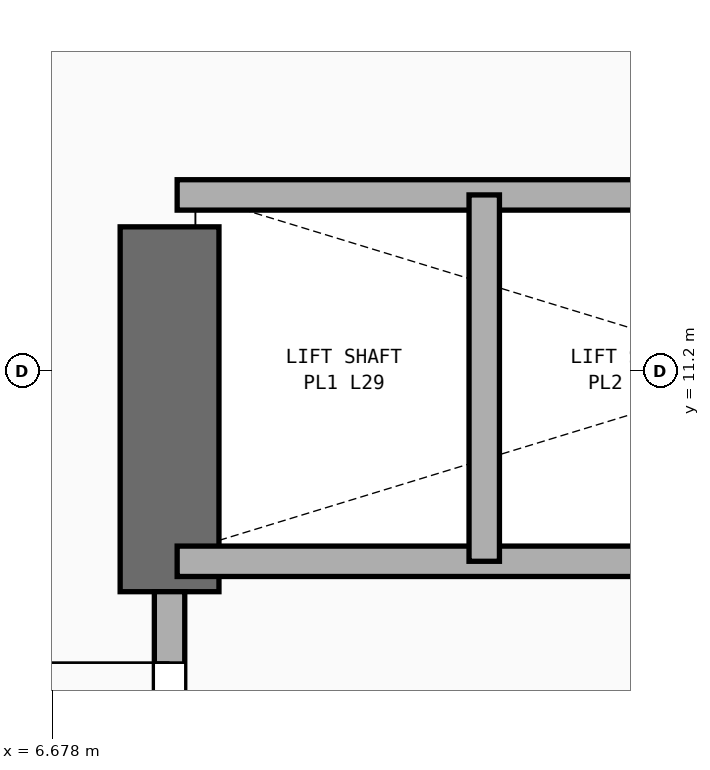
"""IFC4 building model, lengths in metres.
Left out: names, types, materials, properties, quantities, classifications, styles, units other than length and angle.
Written with IfcOpenShell. Run it as: python <this file> out.ifc"""

import sys

from ifc_helpers import new_model, si_unit, direction, frame, frame_2d, origin, place, context, subcontext, project, spatial, rectangle, extrude, element, fill, save


model = new_model("IFC4")
c1 = context("Model", 3, precision=1e-05, world=origin(), true_north=direction((0.0, 1.0)))
c2 = subcontext(c1, "Body", "Model", "MODEL_VIEW")
j1 = project(units=[si_unit("LENGTHUNIT", "METRE"), si_unit("PLANEANGLEUNIT", "RADIAN")], contexts=[c1])
p1 = place(None, origin())
s1 = spatial("IfcSite", under=j1, at=p1, CompositionType="ELEMENT")
p2 = place(p1, origin())
s2 = spatial("IfcBuilding", under=s1, at=p2, CompositionType="ELEMENT")
p3 = place(p2, frame((0.0, 0.0, 114.5)))
s3 = spatial("IfcBuildingStorey", under=s2, at=p3, CompositionType="ELEMENT", Elevation=114.5)
p4 = place(p3, frame((7.45, 9.75, 0.0), z_axis=(0.0, 0.0, 1.0), x_axis=(0.0, 1.0, 0.0)))
e1 = element("IfcWall", 1, at=p4, inside=s3, PredefinedType="SHEAR", context=c2, shape_type="SweptSolid", body=[
    extrude(rectangle(XDim=2.4, YDim=0.65, at=frame_2d((1.2, 0.0))), origin(), (0.0, 0.0, 1.0), 3.54),
])
p5 = place(p3, frame((7.5, 9.95, 0.0), z_axis=(0.0, 0.0, 1.0), x_axis=(1.0, 0.0, 0.0)))
e2 = element("IfcWall", 2, at=p5, inside=s3, PredefinedType="PARTITIONING", context=c2, shape_type="SweptSolid", body=[
    extrude(rectangle(XDim=8.35, YDim=0.2, at=frame_2d((4.175, 0.0))), origin(), (0.0, 0.0, 1.0), 3.54),
])
p6 = place(p3, frame((7.45, 7.45, 0.0), z_axis=(0.0, 0.0, 1.0), x_axis=(0.0, 1.0, 0.0)))
e3 = element("IfcWall", 3, at=p6, inside=s3, PredefinedType="PARTITIONING", context=c2, shape_type="SweptSolid", body=[
    extrude(rectangle(XDim=2.3, YDim=0.2, at=frame_2d((1.15, 0.0))), origin(), (0.0, 0.0, 1.0), 2.52),
])
p7 = place(p6, frame((0.633, 0.0, 0.0)))
e4 = element("IfcOpeningElement", 4, at=p7, cuts=e3, PredefinedType="OPENING", context=c2, shape_type="SweptSolid", body=[
    extrude(rectangle(XDim=1.2, YDim=2.25, at=frame_2d((0.6, 1.125))), frame((0.0, 0.11, 0.0), z_axis=(0.0, -1.0, 0.0), x_axis=(1.0, 0.0, 0.0)), (0.0, 0.0, 1.0), 0.22),
])
p8 = place(p3, frame((7.5, 12.36, 0.0), z_axis=(0.0, 0.0, 1.0), x_axis=(1.0, 0.0, 0.0)))
e5 = element("IfcWall", 5, at=p8, inside=s3, PredefinedType="PARTITIONING", context=c2, shape_type="SweptSolid", body=[
    extrude(rectangle(XDim=7.85, YDim=0.2, at=frame_2d((3.925, 0.0))), origin(), (0.0, 0.0, 1.0), 3.54),
])
p9 = place(p3, frame((9.52, 9.95, 0.0), z_axis=(0.0, 0.0, 1.0), x_axis=(0.0, 1.0, 0.0)))
e6 = element("IfcWall", 6, at=p9, inside=s3, PredefinedType="PARTITIONING", context=c2, shape_type="SweptSolid", body=[
    extrude(rectangle(XDim=2.41, YDim=0.2, at=frame_2d((1.205, 0.0))), origin(), (0.0, 0.0, 1.0), 3.54),
])
p10 = place(p7, frame((1.2, 0.0, 0.0), z_axis=(0.0, 0.0, 1.0), x_axis=(-1.0, 0.0, 0.0)))
e7 = element("IfcDoor", 7, at=p10, inside=s3, OperationType="SINGLE_SWING_LEFT", PredefinedType="DOOR", context=c2, shape_type="SweptSolid", body=[
    extrude(rectangle(XDim=1.2, YDim=2.25, at=frame_2d((0.6, 1.125))), frame((0.0, 0.025, 0.0), z_axis=(0.0, -1.0, 0.0), x_axis=(1.0, 0.0, 0.0)), (0.0, 0.0, 1.0), 0.05),
])
fill(e4, e7)
save(model, sys.argv[1])
